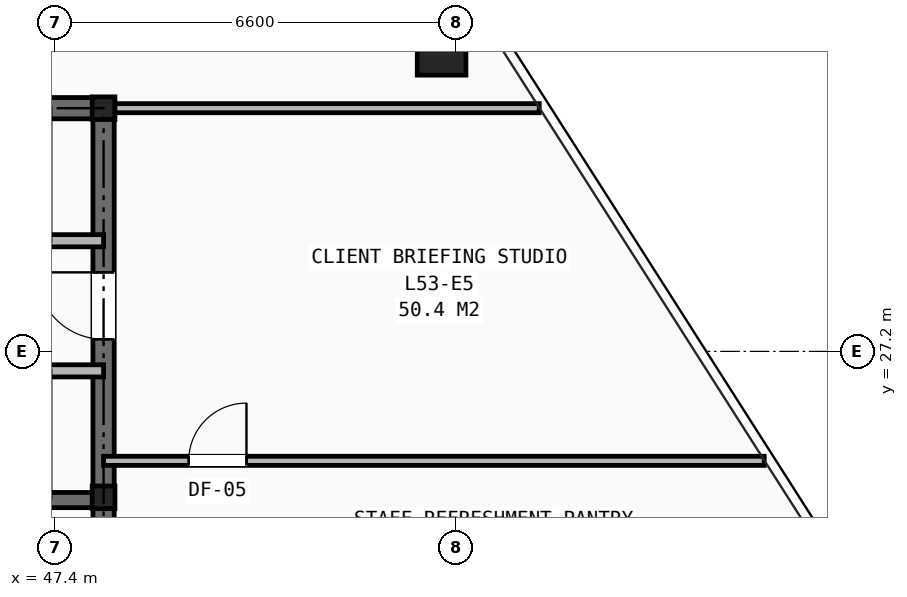
"""IFC4 building model, lengths in metres.
Left out: names, types, materials, properties, quantities, classifications, styles, units other than length and angle.
Written with IfcOpenShell. Run it as: python <this file> out.ifc"""

import sys

from ifc_helpers import new_model, si_unit, direction, frame, frame_2d, origin, origin_2d, place, context, subcontext, project, spatial, rectangle, hollow_rectangle, i_section, extrude, element, fill, save


model = new_model("IFC4")
c1 = context("Model", 3, precision=1e-05, world=origin(), true_north=direction((0.0, 1.0)))
c2 = subcontext(c1, "Body", "Model", "MODEL_VIEW")
j1 = project(units=[si_unit("LENGTHUNIT", "METRE"), si_unit("PLANEANGLEUNIT", "RADIAN")], contexts=[c1])
p1 = place(None, origin())
s1 = spatial("IfcSite", under=j1, at=p1, CompositionType="ELEMENT")
p2 = place(p1, origin())
s2 = spatial("IfcBuilding", under=s1, at=p2, CompositionType="ELEMENT")
p3 = place(p2, frame((0.0, 0.0, 186.15)))
s3 = spatial("IfcBuildingStorey", under=s2, at=p3, CompositionType="ELEMENT", Elevation=186.15)
for number, where, z_axis, x_axis in (
    (1, (48.2, 24.8, 0.0), (0.0, 0.0, 1.0), (1.0, 0.0, 0.0)),
    (2, (48.2, 31.2, 0.0), (0.0, 0.0, 1.0), (1.0, 0.0, 0.0)),
):
    element("IfcColumn", number, at=place(p3, frame(where, z_axis=z_axis, x_axis=x_axis)), inside=s3, PredefinedType="COLUMN", context=c2, shape_type="SweptSolid", body=[
        extrude(i_section(OverallWidth=0.374, OverallDepth=0.372, WebThickness=0.016, FlangeThickness=0.026, at=origin_2d()), origin(), (0.0, 0.0, 1.0), 3.45),
    ])
p4 = place(p3, frame((53.759, 32.144, 0.0), z_axis=(0.0, 0.0, 1.0), x_axis=(1.0, 0.0, 0.0)))
e3 = element("IfcColumn", 3, at=p4, inside=s3, PredefinedType="COLUMN", context=c2, shape_type="SweptSolid", body=[
    extrude(hollow_rectangle(XDim=0.8, YDim=0.8, WallThickness=0.055, at=origin_2d()), origin(), (0.0, 0.0, 1.0), 3.45),
])
p5 = place(p3, frame((31.8, 31.2, 0.0), z_axis=(0.0, 0.0, 1.0), x_axis=(1.0, 0.0, 0.0)))
e4 = element("IfcWall", 4, at=p5, inside=s3, PredefinedType="SHEAR", context=c2, shape_type="SweptSolid", body=[
    extrude(rectangle(XDim=16.4, YDim=0.35, at=frame_2d((8.2, 0.0))), origin(), (0.0, 0.0, 1.0), 3.21),
])
p6 = place(p3, frame((48.2, 16.4, 0.0), z_axis=(0.0, 0.0, 1.0), x_axis=(0.0, 1.0, 0.0)))
e5 = element("IfcWall", 5, at=p6, inside=s3, PredefinedType="SHEAR", context=c2, shape_type="SweptSolid", body=[
    extrude(rectangle(XDim=14.8, YDim=0.35, at=frame_2d((7.4, 0.0))), origin(), (0.0, 0.0, 1.0), 3.21),
])
p7 = place(p6, frame((11.0, 0.0, 0.0)))
e6 = element("IfcOpeningElement", 6, at=p7, cuts=e5, PredefinedType="OPENING", context=c2, shape_type="SweptSolid", body=[
    extrude(rectangle(XDim=1.1, YDim=2.15, at=frame_2d((0.55, 1.075))), frame((0.0, 0.185, 0.0), z_axis=(0.0, -1.0, 0.0), x_axis=(1.0, 0.0, 0.0)), (0.0, 0.0, 1.0), 0.37),
])
p8 = place(p3, frame((44.955, 24.755, 0.0), z_axis=(0.0, 0.0, 1.0), x_axis=(1.0, 0.0, 0.0)))
e7 = element("IfcWall", 7, at=p8, inside=s3, PredefinedType="SHEAR", context=c2, shape_type="SweptSolid", body=[
    extrude(rectangle(XDim=3.245, YDim=0.25, at=frame_2d((1.623, 0.0))), origin(), (0.0, 0.0, 1.0), 3.21),
])
p9 = place(p3, frame((33.82, 29.02, 0.0), z_axis=(0.0, 0.0, 1.0), x_axis=(1.0, 0.0, 0.0)))
e8 = element("IfcWall", 8, at=p9, inside=s3, PredefinedType="SOLIDWALL", context=c2, shape_type="SweptSolid", body=[
    extrude(rectangle(XDim=14.38, YDim=0.2, at=frame_2d((7.19, 0.0))), origin(), (0.0, 0.0, 1.0), 2.665),
])
p10 = place(p9, frame((1.78, 0.0, 0.0)))
e9 = element("IfcOpeningElement", 9, at=p10, cuts=e8, PredefinedType="OPENING", context=c2, shape_type="SweptSolid", body=[
    extrude(rectangle(XDim=0.9, YDim=2.1, at=frame_2d((0.45, 1.05))), frame((0.0, 0.11, 0.0), z_axis=(0.0, -1.0, 0.0), x_axis=(1.0, 0.0, 0.0)), (0.0, 0.0, 1.0), 0.22),
])
p11 = place(p9, frame((6.07, 0.0, 0.0)))
e10 = element("IfcOpeningElement", 10, at=p11, cuts=e8, PredefinedType="OPENING", context=c2, shape_type="SweptSolid", body=[
    extrude(rectangle(XDim=0.9, YDim=2.1, at=frame_2d((0.45, 1.05))), frame((0.0, 0.11, 0.0), z_axis=(0.0, -1.0, 0.0), x_axis=(1.0, 0.0, 0.0)), (0.0, 0.0, 1.0), 0.22),
])
p12 = place(p3, frame((31.8, 26.88, 0.0), z_axis=(0.0, 0.0, 1.0), x_axis=(1.0, 0.0, 0.0)))
e11 = element("IfcWall", 11, at=p12, inside=s3, PredefinedType="SOLIDWALL", context=c2, shape_type="SweptSolid", body=[
    extrude(rectangle(XDim=16.4, YDim=0.2, at=frame_2d((8.2, 0.0))), origin(), (0.0, 0.0, 1.0), 2.665),
])
p13 = place(p12, frame((0.55, 0.0, 0.0)))
e12 = element("IfcOpeningElement", 12, at=p13, cuts=e11, PredefinedType="OPENING", context=c2, shape_type="SweptSolid", body=[
    extrude(rectangle(XDim=0.85, YDim=2.05, at=frame_2d((0.425, 1.025))), frame((0.0, 0.11, 0.0), z_axis=(0.0, -1.0, 0.0), x_axis=(1.0, 0.0, 0.0)), (0.0, 0.0, 1.0), 0.22),
])
p14 = place(p12, frame((2.55, 0.0, 0.0)))
e13 = element("IfcOpeningElement", 13, at=p14, cuts=e11, PredefinedType="OPENING", context=c2, shape_type="SweptSolid", body=[
    extrude(rectangle(XDim=1.1, YDim=2.15, at=frame_2d((0.55, 1.075))), frame((0.0, 0.11, 0.0), z_axis=(0.0, -1.0, 0.0), x_axis=(1.0, 0.0, 0.0)), (0.0, 0.0, 1.0), 0.22),
])
p15 = place(p12, frame((4.71, 0.0, 0.0)))
e14 = element("IfcOpeningElement", 14, at=p15, cuts=e11, PredefinedType="OPENING", context=c2, shape_type="SweptSolid", body=[
    extrude(rectangle(XDim=1.1, YDim=2.15, at=frame_2d((0.55, 1.075))), frame((0.0, 0.11, 0.0), z_axis=(0.0, -1.0, 0.0), x_axis=(1.0, 0.0, 0.0)), (0.0, 0.0, 1.0), 0.22),
])
p16 = place(p12, frame((6.87, 0.0, 0.0)))
e15 = element("IfcOpeningElement", 15, at=p16, cuts=e11, PredefinedType="OPENING", context=c2, shape_type="SweptSolid", body=[
    extrude(rectangle(XDim=1.1, YDim=2.15, at=frame_2d((0.55, 1.075))), frame((0.0, 0.11, 0.0), z_axis=(0.0, -1.0, 0.0), x_axis=(1.0, 0.0, 0.0)), (0.0, 0.0, 1.0), 0.22),
])
p17 = place(p12, frame((9.03, 0.0, 0.0)))
e16 = element("IfcOpeningElement", 16, at=p17, cuts=e11, PredefinedType="OPENING", context=c2, shape_type="SweptSolid", body=[
    extrude(rectangle(XDim=1.1, YDim=2.15, at=frame_2d((0.55, 1.075))), frame((0.0, 0.11, 0.0), z_axis=(0.0, -1.0, 0.0), x_axis=(1.0, 0.0, 0.0)), (0.0, 0.0, 1.0), 0.22),
])
p18 = place(p3, frame((48.2, 31.2, 0.0), z_axis=(0.0, 0.0, 1.0), x_axis=(1.0, 0.0, 0.0)))
e17 = element("IfcWall", 17, at=p18, inside=s3, PredefinedType="PARTITIONING", context=c2, shape_type="SweptSolid", body=[
    extrude(rectangle(XDim=7.165, YDim=0.15, at=frame_2d((3.582, 0.0))), origin(), (0.0, 0.0, 1.0), 2.252),
])
p19 = place(p3, frame((48.2, 25.4, 0.0), z_axis=(0.0, 0.0, 1.0), x_axis=(1.0, 0.0, 0.0)))
e18 = element("IfcWall", 18, at=p19, inside=s3, PredefinedType="PARTITIONING", context=c2, shape_type="SweptSolid", body=[
    extrude(rectangle(XDim=10.865, YDim=0.15, at=frame_2d((5.433, 0.0))), origin(), (0.0, 0.0, 1.0), 2.589),
])
p20 = place(p19, frame((1.4, 0.0, 0.0)))
e19 = element("IfcOpeningElement", 19, at=p20, cuts=e18, PredefinedType="OPENING", context=c2, shape_type="SweptSolid", body=[
    extrude(rectangle(XDim=0.95, YDim=2.1, at=frame_2d((0.475, 1.05))), frame((0.0, 0.085, 0.0), z_axis=(0.0, -1.0, 0.0), x_axis=(1.0, 0.0, 0.0)), (0.0, 0.0, 1.0), 0.17),
])
p21 = place(p7, origin())
e20 = element("IfcDoor", 20, at=p21, inside=s3, OperationType="SINGLE_SWING_RIGHT", PredefinedType="DOOR", context=c2, shape_type="SweptSolid", body=[
    extrude(rectangle(XDim=1.1, YDim=2.15, at=frame_2d((0.55, 1.075))), frame((0.0, 0.025, 0.0), z_axis=(0.0, -1.0, 0.0), x_axis=(1.0, 0.0, 0.0)), (0.0, 0.0, 1.0), 0.05),
])
fill(e6, e20)
p22 = place(p20, origin())
e21 = element("IfcDoor", 21, at=p22, inside=s3, OperationType="SINGLE_SWING_RIGHT", PredefinedType="DOOR", context=c2, shape_type="SweptSolid", body=[
    extrude(rectangle(XDim=0.95, YDim=2.1, at=frame_2d((0.475, 1.05))), frame((0.0, 0.025, 0.0), z_axis=(0.0, -1.0, 0.0), x_axis=(1.0, 0.0, 0.0)), (0.0, 0.0, 1.0), 0.05),
])
fill(e19, e21)
save(model, sys.argv[1])
